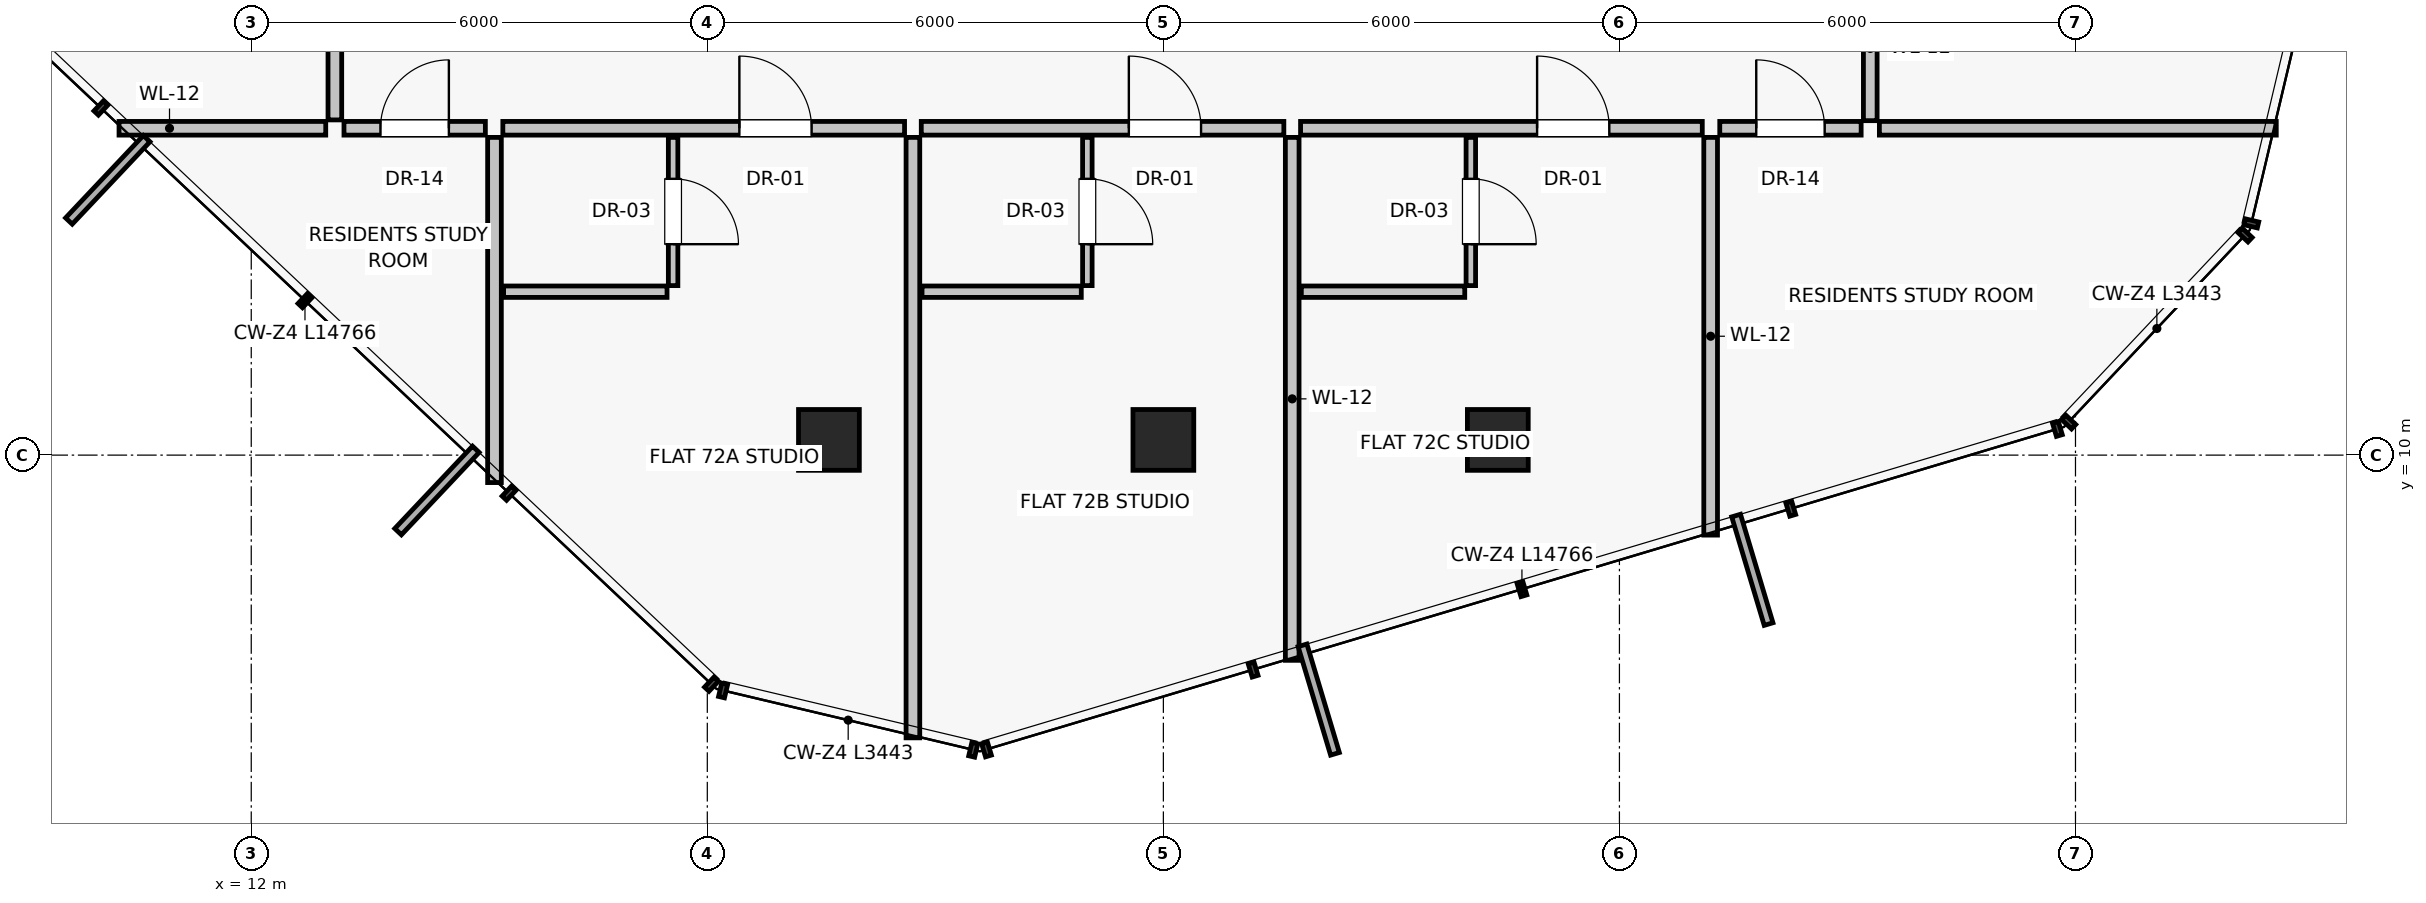
"""IFC4 building model, lengths in metres.
Left out: names, types, materials, properties, quantities, classifications, styles, units other than length and angle.
Written with IfcOpenShell. Run it as: python <this file> out.ifc"""

import sys

from ifc_helpers import new_model, si_unit, direction, frame, frame_2d, origin, origin_2d, place, context, subcontext, project, spatial, rectangle, extrude, source, transform, mapped, element, fill, save


model = new_model("IFC4")
c1 = context("Model", 3, precision=1e-05, world=origin(), true_north=direction((0.0, 1.0)))
c2 = subcontext(c1, "Body", "Model", "MODEL_VIEW")
j1 = project(units=[si_unit("LENGTHUNIT", "METRE"), si_unit("PLANEANGLEUNIT", "RADIAN")], contexts=[c1])
p1 = place(None, origin())
s1 = spatial("IfcSite", under=j1, at=p1, CompositionType="ELEMENT")
p2 = place(p1, origin())
s2 = spatial("IfcBuilding", under=s1, at=p2, CompositionType="ELEMENT")
p3 = place(p2, frame((0.0, 0.0, 254.5)))
s3 = spatial("IfcBuildingStorey", under=s2, at=p3, CompositionType="ELEMENT", Elevation=254.5)
for number, where, z_axis, x_axis in (
    (1, (19.6, 10.2, 0.0), (0.0, 0.0, 1.0), (1.0, 0.0, 0.0)),
    (2, (24.0, 10.2, 0.0), (0.0, 0.0, 1.0), (1.0, 0.0, 0.0)),
    (3, (28.4, 10.2, 0.0), (0.0, 0.0, 1.0), (1.0, 0.0, 0.0)),
):
    element("IfcColumn", number, at=place(p3, frame(where, z_axis=z_axis, x_axis=x_axis)), inside=s3, PredefinedType="COLUMN", context=c2, shape_type="SweptSolid", body=[
        extrude(rectangle(XDim=0.8, YDim=0.8, at=origin_2d()), origin(), (0.0, 0.0, 1.0), 3.25),
    ])
p4 = place(p3, frame((15.2, 14.18, 0.0), z_axis=(0.0, 0.0, 1.0), x_axis=(0.0, -1.0, 0.0)))
e4 = element("IfcWall", 4, at=p4, inside=s3, PredefinedType="PARTITIONING", context=c2, shape_type="SweptSolid", body=[
    extrude(rectangle(XDim=4.541, YDim=0.18, at=frame_2d((2.271, 0.0))), origin(), (0.0, 0.0, 1.0), 3.015),
])
p5 = place(p3, frame((31.2, 14.18, 0.0), z_axis=(0.0, 0.0, 1.0), x_axis=(0.0, -1.0, 0.0)))
e5 = element("IfcWall", 5, at=p5, inside=s3, PredefinedType="PARTITIONING", context=c2, shape_type="SweptSolid", body=[
    extrude(rectangle(XDim=5.232, YDim=0.18, at=frame_2d((2.616, 0.0))), origin(), (0.0, 0.0, 1.0), 3.015),
])
p6 = place(p3, frame((15.31, 14.3, 0.0), z_axis=(0.0, 0.0, 1.0), x_axis=(1.0, 0.0, 0.0)))
e6 = element("IfcWall", 6, at=p6, inside=s3, PredefinedType="PARTITIONING", context=c2, shape_type="SweptSolid", body=[
    extrude(rectangle(XDim=5.285, YDim=0.18, at=frame_2d((2.643, 0.0))), origin(), (0.0, 0.0, 1.0), 3.015),
])
p7 = place(p6, frame((3.112, 0.0, 0.0)))
e7 = element("IfcOpeningElement", 7, at=p7, cuts=e6, PredefinedType="OPENING", context=c2, shape_type="SweptSolid", body=[
    extrude(rectangle(XDim=0.95, YDim=2.02, at=frame_2d((0.475, 1.01))), frame((0.0, 0.1, 0.0), z_axis=(0.0, -1.0, 0.0), x_axis=(1.0, 0.0, 0.0)), (0.0, 0.0, 1.0), 0.2),
])
p8 = place(p3, frame((17.55, 14.18, 0.0), z_axis=(0.0, 0.0, 1.0), x_axis=(0.0, -1.0, 0.0)))
e8 = element("IfcWall", 8, at=p8, inside=s3, PredefinedType="PARTITIONING", context=c2, shape_type="SweptSolid", body=[
    extrude(rectangle(XDim=1.95, YDim=0.125, at=frame_2d((0.975, 0.0))), origin(), (0.0, 0.0, 1.0), 3.015),
])
p9 = place(p8, frame((0.545, 0.0, 0.0)))
e9 = element("IfcOpeningElement", 9, at=p9, cuts=e8, PredefinedType="OPENING", context=c2, shape_type="SweptSolid", body=[
    extrude(rectangle(XDim=0.86, YDim=2.01, at=frame_2d((0.43, 1.005))), frame((0.0, 0.073, 0.0), z_axis=(0.0, -1.0, 0.0), x_axis=(1.0, 0.0, 0.0)), (0.0, 0.0, 1.0), 0.145),
])
p10 = place(p3, frame((15.32, 12.15, 0.0), z_axis=(0.0, 0.0, 1.0), x_axis=(1.0, 0.0, 0.0)))
e10 = element("IfcWall", 10, at=p10, inside=s3, PredefinedType="PARTITIONING", context=c2, shape_type="SweptSolid", body=[
    extrude(rectangle(XDim=2.15, YDim=0.15, at=frame_2d((1.075, 0.0))), origin(), (0.0, 0.0, 1.0), 3.015),
])
p11 = place(p3, frame((20.705, 14.18, 0.0), z_axis=(0.0, 0.0, 1.0), x_axis=(0.0, -1.0, 0.0)))
e11 = element("IfcWall", 11, at=p11, inside=s3, PredefinedType="PARTITIONING", context=c2, shape_type="SweptSolid", body=[
    extrude(rectangle(XDim=7.899, YDim=0.18, at=frame_2d((3.95, 0.0))), origin(), (0.0, 0.0, 1.0), 2.543),
])
p12 = place(p3, frame((20.815, 14.3, 0.0), z_axis=(0.0, 0.0, 1.0), x_axis=(1.0, 0.0, 0.0)))
e12 = element("IfcWall", 12, at=p12, inside=s3, PredefinedType="PARTITIONING", context=c2, shape_type="SweptSolid", body=[
    extrude(rectangle(XDim=4.77, YDim=0.18, at=frame_2d((2.385, 0.0))), origin(), (0.0, 0.0, 1.0), 3.015),
])
p13 = place(p12, frame((2.731, 0.0, 0.0)))
e13 = element("IfcOpeningElement", 13, at=p13, cuts=e12, PredefinedType="OPENING", context=c2, shape_type="SweptSolid", body=[
    extrude(rectangle(XDim=0.95, YDim=2.02, at=frame_2d((0.475, 1.01))), frame((0.0, 0.1, 0.0), z_axis=(0.0, -1.0, 0.0), x_axis=(1.0, 0.0, 0.0)), (0.0, 0.0, 1.0), 0.2),
])
p14 = place(p3, frame((23.0, 14.18, 0.0), z_axis=(0.0, 0.0, 1.0), x_axis=(0.0, -1.0, 0.0)))
e14 = element("IfcWall", 14, at=p14, inside=s3, PredefinedType="PARTITIONING", context=c2, shape_type="SweptSolid", body=[
    extrude(rectangle(XDim=1.95, YDim=0.125, at=frame_2d((0.975, 0.0))), origin(), (0.0, 0.0, 1.0), 3.015),
])
p15 = place(p14, frame((0.545, 0.0, 0.0)))
e15 = element("IfcOpeningElement", 15, at=p15, cuts=e14, PredefinedType="OPENING", context=c2, shape_type="SweptSolid", body=[
    extrude(rectangle(XDim=0.86, YDim=2.01, at=frame_2d((0.43, 1.005))), frame((0.0, 0.073, 0.0), z_axis=(0.0, -1.0, 0.0), x_axis=(1.0, 0.0, 0.0)), (0.0, 0.0, 1.0), 0.145),
])
p16 = place(p3, frame((20.825, 12.15, 0.0), z_axis=(0.0, 0.0, 1.0), x_axis=(1.0, 0.0, 0.0)))
e16 = element("IfcWall", 16, at=p16, inside=s3, PredefinedType="PARTITIONING", context=c2, shape_type="SweptSolid", body=[
    extrude(rectangle(XDim=2.095, YDim=0.15, at=frame_2d((1.047, 0.0))), origin(), (0.0, 0.0, 1.0), 3.015),
])
p17 = place(p3, frame((25.695, 14.18, 0.0), z_axis=(0.0, 0.0, 1.0), x_axis=(0.0, -1.0, 0.0)))
e17 = element("IfcWall", 17, at=p17, inside=s3, PredefinedType="PARTITIONING", context=c2, shape_type="SweptSolid", body=[
    extrude(rectangle(XDim=6.88, YDim=0.18, at=frame_2d((3.44, 0.0))), origin(), (0.0, 0.0, 1.0), 3.015),
])
p18 = place(p3, frame((25.805, 14.3, 0.0), z_axis=(0.0, 0.0, 1.0), x_axis=(1.0, 0.0, 0.0)))
e18 = element("IfcWall", 18, at=p18, inside=s3, PredefinedType="PARTITIONING", context=c2, shape_type="SweptSolid", body=[
    extrude(rectangle(XDim=5.285, YDim=0.18, at=frame_2d((2.643, 0.0))), origin(), (0.0, 0.0, 1.0), 3.015),
])
p19 = place(p18, frame((3.112, 0.0, 0.0)))
e19 = element("IfcOpeningElement", 19, at=p19, cuts=e18, PredefinedType="OPENING", context=c2, shape_type="SweptSolid", body=[
    extrude(rectangle(XDim=0.95, YDim=2.02, at=frame_2d((0.475, 1.01))), frame((0.0, 0.1, 0.0), z_axis=(0.0, -1.0, 0.0), x_axis=(1.0, 0.0, 0.0)), (0.0, 0.0, 1.0), 0.2),
])
p20 = place(p3, frame((28.045, 14.18, 0.0), z_axis=(0.0, 0.0, 1.0), x_axis=(0.0, -1.0, 0.0)))
e20 = element("IfcWall", 20, at=p20, inside=s3, PredefinedType="PARTITIONING", context=c2, shape_type="SweptSolid", body=[
    extrude(rectangle(XDim=1.95, YDim=0.125, at=frame_2d((0.975, 0.0))), origin(), (0.0, 0.0, 1.0), 3.015),
])
p21 = place(p20, frame((0.545, 0.0, 0.0)))
e21 = element("IfcOpeningElement", 21, at=p21, cuts=e20, PredefinedType="OPENING", context=c2, shape_type="SweptSolid", body=[
    extrude(rectangle(XDim=0.86, YDim=2.01, at=frame_2d((0.43, 1.005))), frame((0.0, 0.073, 0.0), z_axis=(0.0, -1.0, 0.0), x_axis=(1.0, 0.0, 0.0)), (0.0, 0.0, 1.0), 0.145),
])
p22 = place(p3, frame((25.815, 12.15, 0.0), z_axis=(0.0, 0.0, 1.0), x_axis=(1.0, 0.0, 0.0)))
e22 = element("IfcWall", 22, at=p22, inside=s3, PredefinedType="PARTITIONING", context=c2, shape_type="SweptSolid", body=[
    extrude(rectangle(XDim=2.15, YDim=0.15, at=frame_2d((1.075, 0.0))), origin(), (0.0, 0.0, 1.0), 3.015),
])
p23 = place(p3, frame((12.98, 14.3, 0.0), z_axis=(0.0, 0.0, 1.0), x_axis=(-1.0, 0.0, 0.0)))
e23 = element("IfcWall", 23, at=p23, inside=s3, PredefinedType="PARTITIONING", context=c2, shape_type="SweptSolid", body=[
    extrude(rectangle(XDim=2.719, YDim=0.18, at=frame_2d((1.36, 0.0))), origin(), (0.0, 0.0, 1.0), 3.015),
])
p24 = place(p3, frame((13.1, 14.41, 0.0), z_axis=(0.0, 0.0, 1.0), x_axis=(0.0, 1.0, 0.0)))
e24 = element("IfcWall", 24, at=p24, inside=s3, PredefinedType="PARTITIONING", context=c2, shape_type="SweptSolid", body=[
    extrude(rectangle(XDim=4.224, YDim=0.18, at=frame_2d((2.112, 0.0))), origin(), (0.0, 0.0, 1.0), 2.662),
])
p25 = place(p24, frame((1.612, 0.0, 0.0)))
e25 = element("IfcOpeningElement", 25, at=p25, cuts=e24, PredefinedType="OPENING", context=c2, shape_type="SweptSolid", body=[
    extrude(rectangle(XDim=1.0, YDim=2.01, at=frame_2d((0.5, 1.005))), frame((0.0, 0.1, 0.0), z_axis=(0.0, -1.0, 0.0), x_axis=(1.0, 0.0, 0.0)), (0.0, 0.0, 1.0), 0.2),
])
p26 = place(p3, frame((33.3, 14.4, 0.0), z_axis=(0.0, 0.0, 1.0), x_axis=(0.0, 1.0, 0.0)))
e26 = element("IfcWall", 26, at=p26, inside=s3, PredefinedType="PARTITIONING", context=c2, shape_type="SweptSolid", body=[
    extrude(rectangle(XDim=1.9, YDim=0.18, at=frame_2d((0.95, 0.0))), origin(), (0.0, 0.0, 1.0), 3.015),
])
p27 = place(p3, frame((13.22, 14.3, 0.0), z_axis=(0.0, 0.0, 1.0), x_axis=(1.0, 0.0, 0.0)))
e27 = element("IfcWall", 27, at=p27, inside=s3, PredefinedType="PARTITIONING", context=c2, shape_type="SweptSolid", body=[
    extrude(rectangle(XDim=1.86, YDim=0.18, at=frame_2d((0.93, 0.0))), origin(), (0.0, 0.0, 1.0), 3.015),
])
p28 = place(p27, frame((0.48, 0.0, 0.0)))
e28 = element("IfcOpeningElement", 28, at=p28, cuts=e27, PredefinedType="OPENING", context=c2, shape_type="SweptSolid", body=[
    extrude(rectangle(XDim=0.9, YDim=2.01, at=frame_2d((0.45, 1.005))), frame((0.0, 0.1, 0.0), z_axis=(0.0, -1.0, 0.0), x_axis=(1.0, 0.0, 0.0)), (0.0, 0.0, 1.0), 0.2),
])
p29 = place(p3, frame((33.42, 14.3, 0.0), z_axis=(0.0, 0.0, 1.0), x_axis=(1.0, 0.0, 0.0)))
e29 = element("IfcWall", 29, at=p29, inside=s3, PredefinedType="PARTITIONING", context=c2, shape_type="SweptSolid", body=[
    extrude(rectangle(XDim=5.221, YDim=0.18, at=frame_2d((2.611, 0.0))), origin(), (0.0, 0.0, 1.0), 3.015),
])
p30 = place(p3, frame((31.32, 14.3, 0.0), z_axis=(0.0, 0.0, 1.0), x_axis=(1.0, 0.0, 0.0)))
e30 = element("IfcWall", 30, at=p30, inside=s3, PredefinedType="PARTITIONING", context=c2, shape_type="SweptSolid", body=[
    extrude(rectangle(XDim=1.86, YDim=0.18, at=frame_2d((0.93, 0.0))), origin(), (0.0, 0.0, 1.0), 3.015),
])
p31 = place(p30, frame((0.48, 0.0, 0.0)))
e31 = element("IfcOpeningElement", 31, at=p31, cuts=e30, PredefinedType="OPENING", context=c2, shape_type="SweptSolid", body=[
    extrude(rectangle(XDim=0.9, YDim=2.01, at=frame_2d((0.45, 1.005))), frame((0.0, 0.1, 0.0), z_axis=(0.0, -1.0, 0.0), x_axis=(1.0, 0.0, 0.0)), (0.0, 0.0, 1.0), 0.2),
])
m1 = source(origin(), c2, "Body", "SweptSolid", [
    extrude(rectangle(XDim=0.95, YDim=2.02, at=frame_2d((0.475, 1.01))), frame((0.0, 0.025, 0.0), z_axis=(0.0, -1.0, 0.0), x_axis=(1.0, 0.0, 0.0)), (0.0, 0.0, 1.0), 0.05),
])
p32 = place(p7, origin())
e32 = element("IfcDoor", 32, at=p32, inside=s3, OperationType="SINGLE_SWING_LEFT", PredefinedType="DOOR", context=c2, shape_type="MappedRepresentation", body=[
    mapped(m1, transform((0.0, 0.0, 0.0), scale=1.0)),
])
fill(e7, e32)
m2 = source(origin(), c2, "Body", "SweptSolid", [
    extrude(rectangle(XDim=0.86, YDim=2.01, at=frame_2d((0.43, 1.005))), frame((0.0, 0.025, 0.0), z_axis=(0.0, -1.0, 0.0), x_axis=(1.0, 0.0, 0.0)), (0.0, 0.0, 1.0), 0.05),
])
p33 = place(p9, origin())
e33 = element("IfcDoor", 33, at=p33, inside=s3, OperationType="SINGLE_SWING_RIGHT", PredefinedType="DOOR", context=c2, shape_type="MappedRepresentation", body=[
    mapped(m2, transform((0.0, 0.0, 0.0), scale=1.0)),
])
fill(e9, e33)
p34 = place(p13, origin())
e34 = element("IfcDoor", 34, at=p34, inside=s3, OperationType="SINGLE_SWING_LEFT", PredefinedType="DOOR", context=c2, shape_type="MappedRepresentation", body=[
    mapped(m1, transform((0.0, 0.0, 0.0), scale=1.0)),
])
fill(e13, e34)
p35 = place(p15, origin())
e35 = element("IfcDoor", 35, at=p35, inside=s3, OperationType="SINGLE_SWING_RIGHT", PredefinedType="DOOR", context=c2, shape_type="MappedRepresentation", body=[
    mapped(m2, transform((0.0, 0.0, 0.0), scale=1.0)),
])
fill(e15, e35)
p36 = place(p19, origin())
e36 = element("IfcDoor", 36, at=p36, inside=s3, OperationType="SINGLE_SWING_LEFT", PredefinedType="DOOR", context=c2, shape_type="MappedRepresentation", body=[
    mapped(m1, transform((0.0, 0.0, 0.0), scale=1.0)),
])
fill(e19, e36)
p37 = place(p21, origin())
e37 = element("IfcDoor", 37, at=p37, inside=s3, OperationType="SINGLE_SWING_RIGHT", PredefinedType="DOOR", context=c2, shape_type="MappedRepresentation", body=[
    mapped(m2, transform((0.0, 0.0, 0.0), scale=1.0)),
])
fill(e21, e37)
m3 = source(origin(), c2, "Body", "SweptSolid", [
    extrude(rectangle(XDim=0.9, YDim=2.01, at=frame_2d((0.45, 1.005))), frame((0.0, 0.025, 0.0), z_axis=(0.0, -1.0, 0.0), x_axis=(1.0, 0.0, 0.0)), (0.0, 0.0, 1.0), 0.05),
])
p38 = place(p28, origin())
e38 = element("IfcDoor", 38, at=p38, inside=s3, OperationType="SINGLE_SWING_RIGHT", PredefinedType="DOOR", context=c2, shape_type="MappedRepresentation", body=[
    mapped(m3, transform((0.0, 0.0, 0.0), scale=1.0)),
])
fill(e28, e38)
p39 = place(p31, origin())
e39 = element("IfcDoor", 39, at=p39, inside=s3, OperationType="SINGLE_SWING_LEFT", PredefinedType="DOOR", context=c2, shape_type="MappedRepresentation", body=[
    mapped(m3, transform((0.0, 0.0, 0.0), scale=1.0)),
])
fill(e31, e39)
save(model, sys.argv[1])
